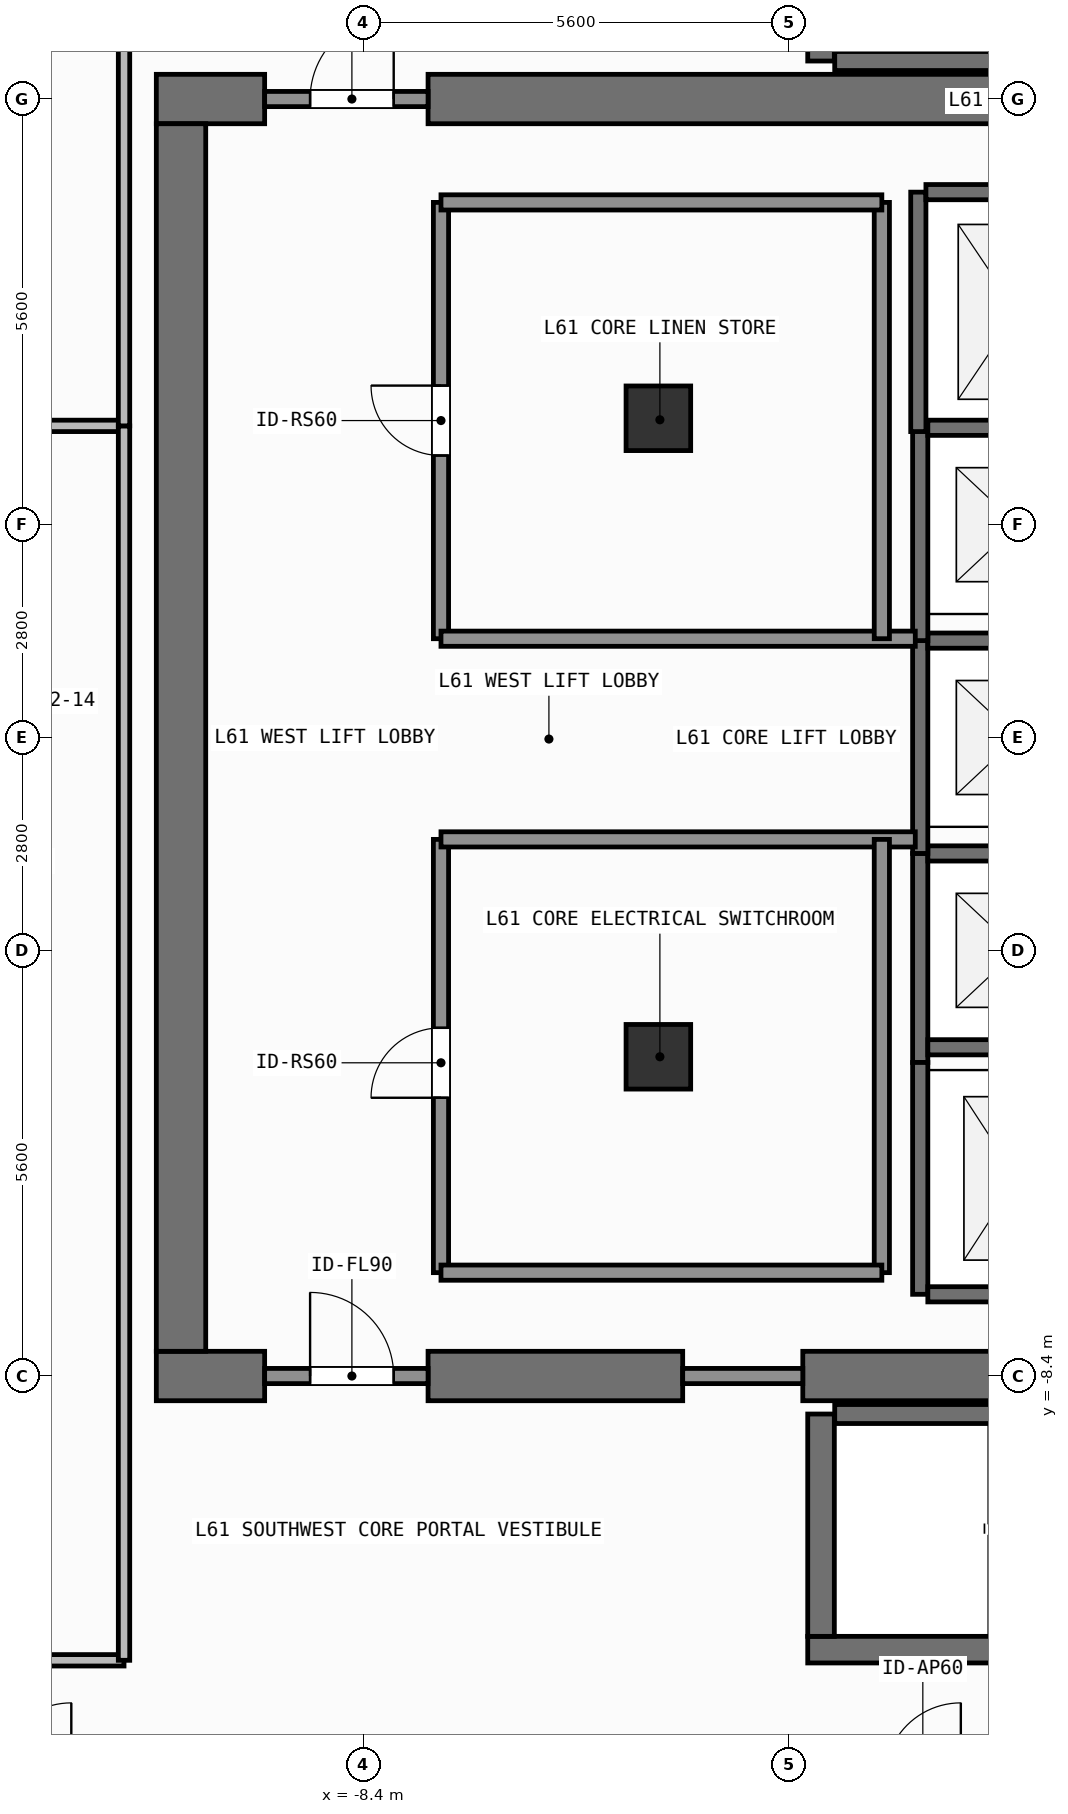
"""IFC4 building model, lengths in metres.
Left out: names, types, materials, properties, quantities, classifications, styles, units other than length and angle.
Written with IfcOpenShell. Run it as: python <this file> out.ifc"""

import sys

from ifc_helpers import new_model, si_unit, direction, frame, frame_2d, origin, origin_2d, place, context, subcontext, project, spatial, rectangle, extrude, element, fill, save


model = new_model("IFC4")
c1 = context("Model", 3, precision=1e-05, world=origin(), true_north=direction((0.0, 1.0)))
c2 = subcontext(c1, "Body", "Model", "MODEL_VIEW")
j1 = project(units=[si_unit("LENGTHUNIT", "METRE"), si_unit("PLANEANGLEUNIT", "RADIAN")], contexts=[c1])
p1 = place(None, origin())
s1 = spatial("IfcSite", under=j1, at=p1, CompositionType="ELEMENT")
p2 = place(p1, origin())
s2 = spatial("IfcBuilding", under=s1, at=p2, CompositionType="ELEMENT")
p3 = place(p2, frame((0.0, 0.0, 250.8)))
s3 = spatial("IfcBuildingStorey", under=s2, at=p3, CompositionType="ELEMENT", Elevation=250.8)
p4 = place(p3, frame((-11.125, -8.4, 0.0), z_axis=(0.0, 0.0, 1.0), x_axis=(1.0, 0.0, 0.0)))
e1 = element("IfcWall", 1, at=p4, inside=s3, PredefinedType="SHEAR", context=c2, shape_type="SweptSolid", body=[
    extrude(rectangle(XDim=1.425, YDim=0.65, at=frame_2d((0.712, 0.0))), origin(), (0.0, 0.0, 1.0), 3.9),
])
p5 = place(p3, frame((-7.55, -8.4, 0.0), z_axis=(0.0, 0.0, 1.0), x_axis=(1.0, 0.0, 0.0)))
e2 = element("IfcWall", 2, at=p5, inside=s3, PredefinedType="SHEAR", context=c2, shape_type="SweptSolid", body=[
    extrude(rectangle(XDim=3.35, YDim=0.65, at=frame_2d((1.675, 0.0))), origin(), (0.0, 0.0, 1.0), 3.9),
])
p6 = place(p3, frame((-2.62, -8.4, 0.0), z_axis=(0.0, 0.0, 1.0), x_axis=(1.0, 0.0, 0.0)))
e3 = element("IfcWall", 3, at=p6, inside=s3, PredefinedType="SHEAR", context=c2, shape_type="SweptSolid", body=[
    extrude(rectangle(XDim=7.27, YDim=0.65, at=frame_2d((3.635, 0.0))), origin(), (0.0, 0.0, 1.0), 3.9),
])
p7 = place(p3, frame((-11.125, 8.4, 0.0), z_axis=(0.0, 0.0, 1.0), x_axis=(1.0, 0.0, 0.0)))
e4 = element("IfcWall", 4, at=p7, inside=s3, PredefinedType="SHEAR", context=c2, shape_type="SweptSolid", body=[
    extrude(rectangle(XDim=1.425, YDim=0.65, at=frame_2d((0.712, 0.0))), origin(), (0.0, 0.0, 1.0), 3.9),
])
p8 = place(p3, frame((-7.55, 8.4, 0.0), z_axis=(0.0, 0.0, 1.0), x_axis=(1.0, 0.0, 0.0)))
e5 = element("IfcWall", 5, at=p8, inside=s3, PredefinedType="SHEAR", context=c2, shape_type="SweptSolid", body=[
    extrude(rectangle(XDim=16.275, YDim=0.65, at=frame_2d((8.138, 0.0))), origin(), (0.0, 0.0, 1.0), 3.9),
])
p9 = place(p3, frame((-10.8, -8.075, 0.0), z_axis=(0.0, 0.0, 1.0), x_axis=(0.0, 1.0, 0.0)))
e6 = element("IfcWall", 6, at=p9, inside=s3, PredefinedType="SHEAR", context=c2, shape_type="SweptSolid", body=[
    extrude(rectangle(XDim=16.15, YDim=0.65, at=frame_2d((8.075, 0.0))), origin(), (0.0, 0.0, 1.0), 3.9),
])
p10 = place(p3, frame((-2.555, -12.0, 0.0), z_axis=(0.0, 0.0, 1.0), x_axis=(1.0, 0.0, 0.0)))
e7 = element("IfcWall", 7, at=p10, inside=s3, PredefinedType="SHEAR", context=c2, shape_type="SweptSolid", body=[
    extrude(rectangle(XDim=7.31, YDim=0.35, at=frame_2d((3.655, 0.0))), origin(), (0.0, 0.0, 1.0), 3.9),
])
p11 = place(p3, frame((-2.2, -8.9, 0.0), z_axis=(0.0, 0.0, 1.0), x_axis=(1.0, 0.0, 0.0)))
e8 = element("IfcWall", 8, at=p11, inside=s3, PredefinedType="SHEAR", context=c2, shape_type="SweptSolid", body=[
    extrude(rectangle(XDim=6.6, YDim=0.25, at=frame_2d((3.3, 0.0))), origin(), (0.0, 0.0, 1.0), 3.9),
])
p12 = place(p3, frame((-2.38, -11.825, 0.0), z_axis=(0.0, 0.0, 1.0), x_axis=(0.0, 1.0, 0.0)))
e9 = element("IfcWall", 9, at=p12, inside=s3, PredefinedType="SHEAR", context=c2, shape_type="SweptSolid", body=[
    extrude(rectangle(XDim=2.925, YDim=0.35, at=frame_2d((1.462, 0.0))), origin(), (0.0, 0.0, 1.0), 3.9),
])
p13 = place(p3, frame((-2.2, 8.9, 0.0), z_axis=(0.0, 0.0, 1.0), x_axis=(1.0, 0.0, 0.0)))
e10 = element("IfcWall", 10, at=p13, inside=s3, PredefinedType="SHEAR", context=c2, shape_type="SweptSolid", body=[
    extrude(rectangle(XDim=6.6, YDim=0.25, at=frame_2d((3.3, 0.0))), origin(), (0.0, 0.0, 1.0), 3.9),
])
p14 = place(p3, frame((-2.38, 8.9, 0.0), z_axis=(0.0, 0.0, 1.0), x_axis=(0.0, 1.0, 0.0)))
e11 = element("IfcWall", 11, at=p14, inside=s3, PredefinedType="SHEAR", context=c2, shape_type="SweptSolid", body=[
    extrude(rectangle(XDim=2.925, YDim=0.35, at=frame_2d((1.462, 0.0))), origin(), (0.0, 0.0, 1.0), 3.9),
])
for number, where, z_axis, x_axis in (
    (12, (-4.52, -4.2, 0.0), (0.0, 0.0, 1.0), (1.0, 0.0, 0.0)),
    (13, (-4.52, 4.2, 0.0), (0.0, 0.0, 1.0), (1.0, 0.0, 0.0)),
):
    element("IfcColumn", number, at=place(p3, frame(where, z_axis=z_axis, x_axis=x_axis)), inside=s3, PredefinedType="COLUMN", context=c2, shape_type="SweptSolid", body=[
        extrude(rectangle(XDim=0.85, YDim=0.85, at=origin_2d()), origin(), (0.0, 0.0, 1.0), 3.9),
    ])
p15 = place(p3, frame((-1.075, -4.275, 0.0), z_axis=(0.0, 0.0, 1.0), x_axis=(0.0, 1.0, 0.0)))
e14 = element("IfcWall", 14, at=p15, inside=s3, PredefinedType="SHEAR", context=c2, shape_type="SweptSolid", body=[
    extrude(rectangle(XDim=2.75, YDim=0.2, at=frame_2d((1.375, 0.0))), origin(), (0.0, 0.0, 1.0), 3.62),
])
for number, where, z_axis, x_axis in (
    (15, (-0.975, -4.075, 0.0), (0.0, 0.0, 1.0), (1.0, 0.0, 0.0)),
    (16, (-0.975, -1.525, 0.0), (0.0, 0.0, 1.0), (1.0, 0.0, 0.0)),
):
    element("IfcWall", number, at=place(p3, frame(where, z_axis=z_axis, x_axis=x_axis)), inside=s3, PredefinedType="SHEAR", context=c2, shape_type="SweptSolid", body=[
        extrude(rectangle(XDim=2.35, YDim=0.2, at=frame_2d((1.175, 0.0))), origin(), (0.0, 0.0, 1.0), 3.62),
    ])
p16 = place(p3, frame((-1.075, -1.525, 0.0), z_axis=(0.0, 0.0, 1.0), x_axis=(0.0, 1.0, 0.0)))
e17 = element("IfcWall", 17, at=p16, inside=s3, PredefinedType="SHEAR", context=c2, shape_type="SweptSolid", body=[
    extrude(rectangle(XDim=2.8, YDim=0.2, at=frame_2d((1.4, 0.0))), origin(), (0.0, 0.0, 1.0), 3.62),
])
p17 = place(p3, frame((-0.975, 1.275, 0.0), z_axis=(0.0, 0.0, 1.0), x_axis=(1.0, 0.0, 0.0)))
e18 = element("IfcWall", 18, at=p17, inside=s3, PredefinedType="SHEAR", context=c2, shape_type="SweptSolid", body=[
    extrude(rectangle(XDim=2.35, YDim=0.2, at=frame_2d((1.175, 0.0))), origin(), (0.0, 0.0, 1.0), 3.62),
])
p18 = place(p3, frame((-1.075, 1.275, 0.0), z_axis=(0.0, 0.0, 1.0), x_axis=(0.0, 1.0, 0.0)))
e19 = element("IfcWall", 19, at=p18, inside=s3, PredefinedType="SHEAR", context=c2, shape_type="SweptSolid", body=[
    extrude(rectangle(XDim=2.8, YDim=0.2, at=frame_2d((1.4, 0.0))), origin(), (0.0, 0.0, 1.0), 3.62),
])
p19 = place(p3, frame((-0.975, 4.075, 0.0), z_axis=(0.0, 0.0, 1.0), x_axis=(1.0, 0.0, 0.0)))
e20 = element("IfcWall", 20, at=p19, inside=s3, PredefinedType="SHEAR", context=c2, shape_type="SweptSolid", body=[
    extrude(rectangle(XDim=2.35, YDim=0.2, at=frame_2d((1.175, 0.0))), origin(), (0.0, 0.0, 1.0), 3.62),
])
p20 = place(p3, frame((-1.1, 4.025, 0.0), z_axis=(0.0, 0.0, 1.0), x_axis=(0.0, 1.0, 0.0)))
e21 = element("IfcWall", 21, at=p20, inside=s3, PredefinedType="SHEAR", context=c2, shape_type="SweptSolid", body=[
    extrude(rectangle(XDim=3.15, YDim=0.2, at=frame_2d((1.575, 0.0))), origin(), (0.0, 0.0, 1.0), 3.62),
])
p21 = place(p3, frame((-1.0, 7.175, 0.0), z_axis=(0.0, 0.0, 1.0), x_axis=(1.0, 0.0, 0.0)))
e22 = element("IfcWall", 22, at=p21, inside=s3, PredefinedType="SHEAR", context=c2, shape_type="SweptSolid", body=[
    extrude(rectangle(XDim=2.4, YDim=0.2, at=frame_2d((1.2, 0.0))), origin(), (0.0, 0.0, 1.0), 3.62),
])
p22 = place(p3, frame((-1.075, -7.325, 0.0), z_axis=(0.0, 0.0, 1.0), x_axis=(0.0, 1.0, 0.0)))
e23 = element("IfcWall", 23, at=p22, inside=s3, PredefinedType="SHEAR", context=c2, shape_type="SweptSolid", body=[
    extrude(rectangle(XDim=3.05, YDim=0.2, at=frame_2d((1.525, 0.0))), origin(), (0.0, 0.0, 1.0), 3.62),
])
p23 = place(p3, frame((-0.975, -7.325, 0.0), z_axis=(0.0, 0.0, 1.0), x_axis=(1.0, 0.0, 0.0)))
e24 = element("IfcWall", 24, at=p23, inside=s3, PredefinedType="SHEAR", context=c2, shape_type="SweptSolid", body=[
    extrude(rectangle(XDim=2.35, YDim=0.2, at=frame_2d((1.175, 0.0))), origin(), (0.0, 0.0, 1.0), 3.62),
])
p24 = place(p3, frame((-9.7, -8.4, 0.0), z_axis=(0.0, 0.0, 1.0), x_axis=(1.0, 0.0, 0.0)))
e25 = element("IfcWall", 25, at=p24, inside=s3, PredefinedType="SOLIDWALL", context=c2, shape_type="SweptSolid", body=[
    extrude(rectangle(XDim=2.15, YDim=0.2, at=frame_2d((1.075, 0.0))), origin(), (0.0, 0.0, 1.0), 2.86),
])
p25 = place(p24, frame((0.598, 0.0, 0.0)))
e26 = element("IfcOpeningElement", 26, at=p25, cuts=e25, PredefinedType="OPENING", context=c2, shape_type="SweptSolid", body=[
    extrude(rectangle(XDim=1.1, YDim=2.15, at=frame_2d((0.55, 1.075))), frame((0.0, 0.11, 0.0), z_axis=(0.0, -1.0, 0.0), x_axis=(1.0, 0.0, 0.0)), (0.0, 0.0, 1.0), 0.22),
])
p26 = place(p3, frame((-9.7, 8.4, 0.0), z_axis=(0.0, 0.0, 1.0), x_axis=(1.0, 0.0, 0.0)))
e27 = element("IfcWall", 27, at=p26, inside=s3, PredefinedType="SOLIDWALL", context=c2, shape_type="SweptSolid", body=[
    extrude(rectangle(XDim=2.15, YDim=0.2, at=frame_2d((1.075, 0.0))), origin(), (0.0, 0.0, 1.0), 2.86),
])
p27 = place(p26, frame((0.598, 0.0, 0.0)))
e28 = element("IfcOpeningElement", 28, at=p27, cuts=e27, PredefinedType="OPENING", context=c2, shape_type="SweptSolid", body=[
    extrude(rectangle(XDim=1.1, YDim=2.15, at=frame_2d((0.55, 1.075))), frame((0.0, 0.11, 0.0), z_axis=(0.0, -1.0, 0.0), x_axis=(1.0, 0.0, 0.0)), (0.0, 0.0, 1.0), 0.22),
])
p28 = place(p3, frame((-7.38, -7.04, 0.0), z_axis=(0.0, 0.0, 1.0), x_axis=(0.0, 1.0, 0.0)))
e29 = element("IfcWall", 29, at=p28, inside=s3, PredefinedType="SOLIDWALL", context=c2, shape_type="SweptSolid", body=[
    extrude(rectangle(XDim=5.7, YDim=0.2, at=frame_2d((2.85, 0.0))), origin(), (0.0, 0.0, 1.0), 3.62),
])
p29 = place(p28, frame((2.301, 0.0, 0.0)))
e30 = element("IfcOpeningElement", 30, at=p29, cuts=e29, PredefinedType="OPENING", context=c2, shape_type="SweptSolid", body=[
    extrude(rectangle(XDim=0.92, YDim=2.1, at=frame_2d((0.46, 1.05))), frame((0.0, 0.11, 0.0), z_axis=(0.0, -1.0, 0.0), x_axis=(1.0, 0.0, 0.0)), (0.0, 0.0, 1.0), 0.22),
])
p30 = place(p3, frame((-7.38, 1.3, 0.0), z_axis=(0.0, 0.0, 1.0), x_axis=(0.0, 1.0, 0.0)))
e31 = element("IfcWall", 31, at=p30, inside=s3, PredefinedType="SOLIDWALL", context=c2, shape_type="SweptSolid", body=[
    extrude(rectangle(XDim=5.74, YDim=0.2, at=frame_2d((2.87, 0.0))), origin(), (0.0, 0.0, 1.0), 3.62),
])
p31 = place(p30, frame((2.41, 0.0, 0.0)))
e32 = element("IfcOpeningElement", 32, at=p31, cuts=e31, PredefinedType="OPENING", context=c2, shape_type="SweptSolid", body=[
    extrude(rectangle(XDim=0.92, YDim=2.1, at=frame_2d((0.46, 1.05))), frame((0.0, 0.11, 0.0), z_axis=(0.0, -1.0, 0.0), x_axis=(1.0, 0.0, 0.0)), (0.0, 0.0, 1.0), 0.22),
])
p32 = place(p3, frame((-18.33, -12.14, 0.0), z_axis=(0.0, 0.0, 1.0), x_axis=(1.0, 0.0, 0.0)))
e33 = element("IfcWall", 33, at=p32, inside=s3, PredefinedType="PARTITIONING", context=c2, shape_type="SweptSolid", body=[
    extrude(rectangle(XDim=6.78, YDim=0.15, at=frame_2d((3.39, 0.0))), origin(), (0.0, 0.0, 1.0), 3.62),
])
p33 = place(p32, frame((2.85, 0.0, 0.0)))
e34 = element("IfcOpeningElement", 34, at=p33, cuts=e33, PredefinedType="OPENING", context=c2, shape_type="SweptSolid", body=[
    extrude(rectangle(XDim=0.9, YDim=2.1, at=frame_2d((0.45, 1.05))), frame((0.0, 0.085, 0.0), z_axis=(0.0, -1.0, 0.0), x_axis=(1.0, 0.0, 0.0)), (0.0, 0.0, 1.0), 0.17),
])
p34 = place(p3, frame((-4.2, -8.4, 0.0), z_axis=(0.0, 0.0, 1.0), x_axis=(1.0, 0.0, 0.0)))
e35 = element("IfcWall", 35, at=p34, inside=s3, PredefinedType="SOLIDWALL", context=c2, shape_type="SweptSolid", body=[
    extrude(rectangle(XDim=1.58, YDim=0.2, at=frame_2d((0.79, 0.0))), origin(), (0.0, 0.0, 1.0), 2.86),
])
for number, where, z_axis, x_axis in (
    (36, (-7.38, -1.34, 0.0), (0.0, 0.0, 1.0), (1.0, 0.0, 0.0)),
    (37, (-7.38, 1.3, 0.0), (0.0, 0.0, 1.0), (1.0, 0.0, 0.0)),
):
    element("IfcWall", number, at=place(p3, frame(where, z_axis=z_axis, x_axis=x_axis)), inside=s3, PredefinedType="SOLIDWALL", context=c2, shape_type="SweptSolid", body=[
        extrude(rectangle(XDim=6.24, YDim=0.2, at=frame_2d((3.12, 0.0))), origin(), (0.0, 0.0, 1.0), 3.62),
    ])
p35 = place(p3, frame((-1.58, -7.04, 0.0), z_axis=(0.0, 0.0, 1.0), x_axis=(0.0, 1.0, 0.0)))
e38 = element("IfcWall", 38, at=p35, inside=s3, PredefinedType="SOLIDWALL", context=c2, shape_type="SweptSolid", body=[
    extrude(rectangle(XDim=5.7, YDim=0.2, at=frame_2d((2.85, 0.0))), origin(), (0.0, 0.0, 1.0), 3.62),
])
p36 = place(p3, frame((-7.38, -7.04, 0.0), z_axis=(0.0, 0.0, 1.0), x_axis=(1.0, 0.0, 0.0)))
e39 = element("IfcWall", 39, at=p36, inside=s3, PredefinedType="SOLIDWALL", context=c2, shape_type="SweptSolid", body=[
    extrude(rectangle(XDim=5.8, YDim=0.2, at=frame_2d((2.9, 0.0))), origin(), (0.0, 0.0, 1.0), 3.62),
])
p37 = place(p3, frame((-1.58, 1.3, 0.0), z_axis=(0.0, 0.0, 1.0), x_axis=(0.0, 1.0, 0.0)))
e40 = element("IfcWall", 40, at=p37, inside=s3, PredefinedType="SOLIDWALL", context=c2, shape_type="SweptSolid", body=[
    extrude(rectangle(XDim=5.74, YDim=0.2, at=frame_2d((2.87, 0.0))), origin(), (0.0, 0.0, 1.0), 3.62),
])
p38 = place(p3, frame((-7.38, 7.04, 0.0), z_axis=(0.0, 0.0, 1.0), x_axis=(1.0, 0.0, 0.0)))
e41 = element("IfcWall", 41, at=p38, inside=s3, PredefinedType="SOLIDWALL", context=c2, shape_type="SweptSolid", body=[
    extrude(rectangle(XDim=5.8, YDim=0.2, at=frame_2d((2.9, 0.0))), origin(), (0.0, 0.0, 1.0), 3.62),
])
p39 = place(p3, frame((-18.33, 4.1, 0.0), z_axis=(0.0, 0.0, 1.0), x_axis=(1.0, 0.0, 0.0)))
e42 = element("IfcWall", 42, at=p39, inside=s3, PredefinedType="PARTITIONING", context=c2, shape_type="SweptSolid", body=[
    extrude(rectangle(XDim=6.78, YDim=0.15, at=frame_2d((3.39, 0.0))), origin(), (0.0, 0.0, 1.0), 3.62),
])
p40 = place(p3, frame((-11.55, -12.14, 0.0), z_axis=(0.0, 0.0, 1.0), x_axis=(0.0, 1.0, 0.0)))
e43 = element("IfcWall", 43, at=p40, inside=s3, PredefinedType="PARTITIONING", context=c2, shape_type="SweptSolid", body=[
    extrude(rectangle(XDim=16.24, YDim=0.15, at=frame_2d((8.12, 0.0))), origin(), (0.0, 0.0, 1.0), 3.62),
])
p41 = place(p3, frame((-11.55, 4.1, 0.0), z_axis=(0.0, 0.0, 1.0), x_axis=(0.0, 1.0, 0.0)))
e44 = element("IfcWall", 44, at=p41, inside=s3, PredefinedType="PARTITIONING", context=c2, shape_type="SweptSolid", body=[
    extrude(rectangle(XDim=8.04, YDim=0.15, at=frame_2d((4.02, 0.0))), origin(), (0.0, 0.0, 1.0), 3.62),
])
p42 = place(p25, origin())
e45 = element("IfcDoor", 45, at=p42, inside=s3, OperationType="SINGLE_SWING_LEFT", PredefinedType="DOOR", context=c2, shape_type="SweptSolid", body=[
    extrude(rectangle(XDim=1.1, YDim=2.15, at=frame_2d((0.55, 1.075))), frame((0.0, 0.025, 0.0), z_axis=(0.0, -1.0, 0.0), x_axis=(1.0, 0.0, 0.0)), (0.0, 0.0, 1.0), 0.05),
])
fill(e26, e45)
p43 = place(p27, origin())
e46 = element("IfcDoor", 46, at=p43, inside=s3, OperationType="SINGLE_SWING_RIGHT", PredefinedType="DOOR", context=c2, shape_type="SweptSolid", body=[
    extrude(rectangle(XDim=1.1, YDim=2.15, at=frame_2d((0.55, 1.075))), frame((0.0, 0.025, 0.0), z_axis=(0.0, -1.0, 0.0), x_axis=(1.0, 0.0, 0.0)), (0.0, 0.0, 1.0), 0.05),
])
fill(e28, e46)
p44 = place(p29, origin())
e47 = element("IfcDoor", 47, at=p44, inside=s3, OperationType="SINGLE_SWING_LEFT", PredefinedType="DOOR", context=c2, shape_type="SweptSolid", body=[
    extrude(rectangle(XDim=0.92, YDim=2.1, at=frame_2d((0.46, 1.05))), frame((0.0, 0.025, 0.0), z_axis=(0.0, -1.0, 0.0), x_axis=(1.0, 0.0, 0.0)), (0.0, 0.0, 1.0), 0.05),
])
fill(e30, e47)
p45 = place(p31, origin())
e48 = element("IfcDoor", 48, at=p45, inside=s3, OperationType="SINGLE_SWING_RIGHT", PredefinedType="DOOR", context=c2, shape_type="SweptSolid", body=[
    extrude(rectangle(XDim=0.92, YDim=2.1, at=frame_2d((0.46, 1.05))), frame((0.0, 0.025, 0.0), z_axis=(0.0, -1.0, 0.0), x_axis=(1.0, 0.0, 0.0)), (0.0, 0.0, 1.0), 0.05),
])
fill(e32, e48)
save(model, sys.argv[1])
